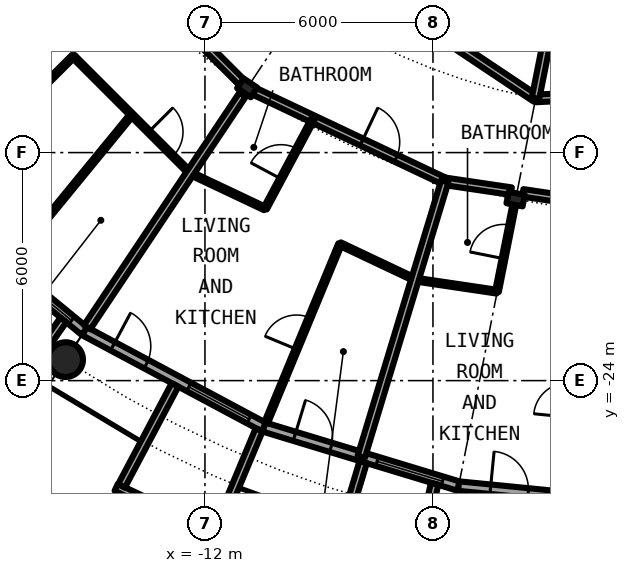
"""IFC4 building model, lengths in metres.
Left out: names, types, materials, properties, quantities, classifications, styles, units other than length and angle.
Written with IfcOpenShell. Run it as: python <this file> out.ifc"""

import sys

from ifc_helpers import new_model, si_unit, direction, frame, frame_2d, origin, origin_2d, place, context, subcontext, project, spatial, rectangle, circle, hollow_circle, i_section, extrude, element, fill, save


model = new_model("IFC4")
c1 = context("Model", 3, precision=1e-05, world=origin(), true_north=direction((0.0, 1.0)))
c2 = subcontext(c1, "Body", "Model", "MODEL_VIEW")
j1 = project(units=[si_unit("LENGTHUNIT", "METRE"), si_unit("PLANEANGLEUNIT", "RADIAN")], contexts=[c1])
p1 = place(None, origin())
s1 = spatial("IfcSite", under=j1, at=p1, CompositionType="ELEMENT")
p2 = place(p1, origin())
s2 = spatial("IfcBuilding", under=s1, at=p2, CompositionType="ELEMENT")
p3 = place(p2, frame((0.0, 0.0, 123.85)))
s3 = spatial("IfcBuildingStorey", under=s2, at=p3, CompositionType="ELEMENT", Elevation=123.85)
p4 = place(p3, frame((-15.667, -23.448, 0.0), z_axis=(0.0, 0.0, 1.0), x_axis=(1.0, 0.0, 0.0)))
e1 = element("IfcColumn", 1, at=p4, inside=s3, PredefinedType="COLUMN", context=c2, shape_type="SweptSolid", body=[
    extrude(hollow_circle(Radius=0.457, WallThickness=0.04, at=origin_2d()), origin(), (0.0, 0.0, 1.0), 3.05),
])
for number, where, z_axis, x_axis in (
    (2, (-10.889, -16.297, 0.0), (0.0, 0.0, 1.0), (-0.556, -0.831, 0.0)),
    (3, (-3.824, -19.223, 0.0), (0.0, 0.0, 1.0), (-0.195, -0.981, 0.0)),
):
    element("IfcColumn", number, at=place(p3, frame(where, z_axis=z_axis, x_axis=x_axis)), inside=s3, PredefinedType="COLUMN", context=c2, shape_type="SweptSolid", body=[
        extrude(i_section(OverallWidth=0.307, OverallDepth=0.432, WebThickness=0.021, FlangeThickness=0.04, FilletRadius=0.027, at=origin_2d()), origin(), (0.0, 0.0, 1.0), 3.05),
    ])
p5 = place(p3, frame((-19.304, -19.304, 0.0), z_axis=(0.0, 0.0, 1.0), x_axis=(0.773019449054, -0.634382322723, 0.0)))
e4 = element("IfcWall", 4, at=p5, inside=s3, PredefinedType="SOLIDWALL", context=c2, shape_type="SweptSolid", body=[
    extrude(rectangle(XDim=5.352, YDim=0.25, at=frame_2d((2.676, 0.0))), origin(), (0.0, 0.0, 1.0), 2.7),
])
p6 = place(p5, frame((0.841, 0.0, 0.0)))
e5 = element("IfcOpeningElement", 5, at=p6, cuts=e4, PredefinedType="OPENING", context=c2, shape_type="SweptSolid", body=[
    extrude(rectangle(XDim=1.0, YDim=2.2, at=frame_2d((0.5, 1.1))), frame((0.0, 0.135, 0.0), z_axis=(0.0, -1.0, 0.0), x_axis=(1.0, 0.0, 0.0)), (0.0, 0.0, 1.0), 0.27),
])
p7 = place(p5, frame((3.111, 0.0, 0.3)))
e6 = element("IfcOpeningElement", 6, at=p7, cuts=e4, PredefinedType="OPENING", context=c2, shape_type="SweptSolid", body=[
    extrude(rectangle(XDim=1.8, YDim=2.1, at=frame_2d((0.9, 1.05))), frame((0.0, 0.135, 0.0), z_axis=(0.0, -1.0, 0.0), x_axis=(1.0, 0.0, 0.0)), (0.0, 0.0, 1.0), 0.27),
])
p8 = place(p3, frame((-15.726, -22.402, -0.03), z_axis=(0.0, 0.0, 1.0), x_axis=(-0.574826383135, -0.818275399393, 0.0)))
e7 = element("IfcWall", 7, at=p8, inside=s3, PredefinedType="SOLIDWALL", context=c2, shape_type="SweptSolid", body=[
    extrude(rectangle(XDim=2.929, YDim=0.2, at=frame_2d((1.465, 0.0))), origin(), (0.0, 0.0, 1.0), 2.73),
])
p9 = place(p3, frame((-15.167, -22.699, 0.0), z_axis=(0.0, 0.0, 1.0), x_axis=(0.881915646801, -0.471407246368, 0.0)))
e8 = element("IfcWall", 8, at=p9, inside=s3, PredefinedType="SOLIDWALL", context=c2, shape_type="SweptSolid", body=[
    extrude(rectangle(XDim=5.352, YDim=0.25, at=frame_2d((2.676, 0.0))), origin(), (0.0, 0.0, 1.0), 2.7),
])
p10 = place(p9, frame((0.841, 0.0, 0.0)))
e9 = element("IfcOpeningElement", 9, at=p10, cuts=e8, PredefinedType="OPENING", context=c2, shape_type="SweptSolid", body=[
    extrude(rectangle(XDim=1.0, YDim=2.2, at=frame_2d((0.5, 1.1))), frame((0.0, 0.135, 0.0), z_axis=(0.0, -1.0, 0.0), x_axis=(1.0, 0.0, 0.0)), (0.0, 0.0, 1.0), 0.27),
])
p11 = place(p9, frame((3.111, 0.0, 0.3)))
e10 = element("IfcOpeningElement", 10, at=p11, cuts=e8, PredefinedType="OPENING", context=c2, shape_type="SweptSolid", body=[
    extrude(rectangle(XDim=1.8, YDim=2.1, at=frame_2d((0.9, 1.05))), frame((0.0, 0.135, 0.0), z_axis=(0.0, -1.0, 0.0), x_axis=(1.0, 0.0, 0.0)), (0.0, 0.0, 1.0), 0.27),
])
p12 = place(p3, frame((-14.335, -26.808, -0.03), z_axis=(0.0, 0.0, 1.0), x_axis=(0.904000060331, -0.427532327342, 0.0)))
e11 = element("IfcWall", 11, at=p12, inside=s3, PredefinedType="SOLIDWALL", context=c2, shape_type="SweptSolid", body=[
    extrude(rectangle(XDim=2.993, YDim=0.2, at=frame_2d((1.497, 0.0))), origin(), (0.0, 0.0, 1.0), 2.73),
])
p13 = place(p12, frame((0.457, 0.0, 0.33)))
e12 = element("IfcOpeningElement", 12, at=p13, cuts=e11, PredefinedType="OPENING", context=c2, shape_type="SweptSolid", body=[
    extrude(circle(Radius=1.04, at=frame_2d((1.04, 1.04))), frame((0.0, 0.11, 0.0), z_axis=(0.0, -1.0, 0.0), x_axis=(1.0, 0.0, 0.0)), (0.0, 0.0, 1.0), 0.22),
])
p14 = place(p3, frame((-12.787, -24.113, -0.03), z_axis=(0.0, 0.0, 1.0), x_axis=(-0.468365282436, -0.883534924159, 0.0)))
e13 = element("IfcWall", 13, at=p14, inside=s3, PredefinedType="SOLIDWALL", context=c2, shape_type="SweptSolid", body=[
    extrude(rectangle(XDim=3.006, YDim=0.2, at=frame_2d((1.503, 0.0))), origin(), (0.0, 0.0, 1.0), 2.73),
])
p15 = place(p3, frame((-10.575, -25.295, -0.03), z_axis=(0.0, 0.0, 1.0), x_axis=(-0.385697364644, -0.922625353492, 0.0)))
e14 = element("IfcWall", 14, at=p15, inside=s3, PredefinedType="SOLIDWALL", context=c2, shape_type="SweptSolid", body=[
    extrude(rectangle(XDim=2.883, YDim=0.2, at=frame_2d((1.442, 0.0))), origin(), (0.0, 0.0, 1.0), 2.73),
])
p16 = place(p3, frame((-10.447, -25.222, 0.0), z_axis=(0.0, 0.0, 1.0), x_axis=(0.956965678721, -0.290201119486, 0.0)))
e15 = element("IfcWall", 15, at=p16, inside=s3, PredefinedType="SOLIDWALL", context=c2, shape_type="SweptSolid", body=[
    extrude(rectangle(XDim=5.351, YDim=0.25, at=frame_2d((2.676, 0.0))), origin(), (0.0, 0.0, 1.0), 2.7),
])
p17 = place(p16, frame((0.841, 0.0, 0.0)))
e16 = element("IfcOpeningElement", 16, at=p17, cuts=e15, PredefinedType="OPENING", context=c2, shape_type="SweptSolid", body=[
    extrude(rectangle(XDim=1.0, YDim=2.2, at=frame_2d((0.5, 1.1))), frame((0.0, 0.135, 0.0), z_axis=(0.0, -1.0, 0.0), x_axis=(1.0, 0.0, 0.0)), (0.0, 0.0, 1.0), 0.27),
])
p18 = place(p16, frame((3.111, 0.0, 0.3)))
e17 = element("IfcOpeningElement", 17, at=p18, cuts=e15, PredefinedType="OPENING", context=c2, shape_type="SweptSolid", body=[
    extrude(rectangle(XDim=1.8, YDim=2.1, at=frame_2d((0.9, 1.05))), frame((0.0, 0.135, 0.0), z_axis=(0.0, -1.0, 0.0), x_axis=(1.0, 0.0, 0.0)), (0.0, 0.0, 1.0), 0.27),
])
p19 = place(p3, frame((-7.837, -26.144, -0.03), z_axis=(0.0, 0.0, 1.0), x_axis=(-0.287064767992, -0.957911174889, 0.0)))
e18 = element("IfcWall", 18, at=p19, inside=s3, PredefinedType="SOLIDWALL", context=c2, shape_type="SweptSolid", body=[
    extrude(rectangle(XDim=3.006, YDim=0.2, at=frame_2d((1.503, 0.0))), origin(), (0.0, 0.0, 1.0), 2.73),
])
p20 = place(p3, frame((-5.957, -26.715, -0.03), z_axis=(0.0, 0.0, 1.0), x_axis=(-0.217857287091, -0.975980636315, 0.0)))
e19 = element("IfcWall", 19, at=p20, inside=s3, PredefinedType="SOLIDWALL", context=c2, shape_type="SweptSolid", body=[
    extrude(rectangle(XDim=2.928, YDim=0.2, at=frame_2d((1.464, 0.0))), origin(), (0.0, 0.0, 1.0), 2.73),
])
p21 = place(p3, frame((-5.326, -26.775, 0.0), z_axis=(0.0, 0.0, 1.0), x_axis=(0.995173996315, -0.098126026407, 0.0)))
e20 = element("IfcWall", 20, at=p21, inside=s3, PredefinedType="SOLIDWALL", context=c2, shape_type="SweptSolid", body=[
    extrude(rectangle(XDim=5.352, YDim=0.25, at=frame_2d((2.676, 0.0))), origin(), (0.0, 0.0, 1.0), 2.7),
])
p22 = place(p21, frame((0.841, 0.0, 0.0)))
e21 = element("IfcOpeningElement", 21, at=p22, cuts=e20, PredefinedType="OPENING", context=c2, shape_type="SweptSolid", body=[
    extrude(rectangle(XDim=1.0, YDim=2.2, at=frame_2d((0.5, 1.1))), frame((0.0, 0.135, 0.0), z_axis=(0.0, -1.0, 0.0), x_axis=(1.0, 0.0, 0.0)), (0.0, 0.0, 1.0), 0.27),
])
p23 = place(p21, frame((3.111, 0.0, 0.3)))
e22 = element("IfcOpeningElement", 22, at=p23, cuts=e20, PredefinedType="OPENING", context=c2, shape_type="SweptSolid", body=[
    extrude(rectangle(XDim=1.8, YDim=2.1, at=frame_2d((0.9, 1.05))), frame((0.0, 0.135, 0.0), z_axis=(0.0, -1.0, 0.0), x_axis=(1.0, 0.0, 0.0)), (0.0, 0.0, 1.0), 0.27),
])
p24 = place(p3, frame((-12.397, -18.537, 0.0), z_axis=(0.0, 0.0, 1.0), x_axis=(0.903951937529, -0.427634066274, 0.0)))
e23 = element("IfcWall", 23, at=p24, inside=s3, PredefinedType="PARTITIONING", context=c2, shape_type="SweptSolid", body=[
    extrude(rectangle(XDim=2.181, YDim=0.1, at=frame_2d((1.091, 0.0))), origin(), (0.0, 0.0, 1.0), 2.7),
])
p25 = place(p3, frame((-8.445, -20.407, 0.0), z_axis=(0.0, 0.0, 1.0), x_axis=(0.903929143338, -0.427682246328, 0.0)))
e24 = element("IfcWall", 24, at=p25, inside=s3, PredefinedType="PARTITIONING", context=c2, shape_type="SweptSolid", body=[
    extrude(rectangle(XDim=2.182, YDim=0.1, at=frame_2d((1.091, 0.0))), origin(), (0.0, 0.0, 1.0), 2.7),
])
p26 = place(p3, frame((-6.473, -21.34, 0.0), z_axis=(0.0, 0.0, 1.0), x_axis=(0.989185420695, -0.146670390618, 0.0)))
e25 = element("IfcWall", 25, at=p26, inside=s3, PredefinedType="PARTITIONING", context=c2, shape_type="SweptSolid", body=[
    extrude(rectangle(XDim=2.181, YDim=0.1, at=frame_2d((1.09, 0.0))), origin(), (0.0, 0.0, 1.0), 2.7),
])
p27 = place(p3, frame((-15.463, -15.468, 0.0), z_axis=(0.0, 0.0, 1.0), x_axis=(0.707106781187, -0.707106781187, 0.0)))
e26 = element("IfcWall", 26, at=p27, inside=s3, PredefinedType="PARTITIONING", context=c2, shape_type="SweptSolid", body=[
    extrude(rectangle(XDim=4.351, YDim=0.1, at=frame_2d((2.176, 0.0))), origin(), (0.0, 0.0, 1.0), 2.7),
])
p28 = place(p27, frame((2.808, 0.0, 0.0)))
e27 = element("IfcOpeningElement", 27, at=p28, cuts=e26, PredefinedType="OPENING", context=c2, shape_type="SweptSolid", body=[
    extrude(rectangle(XDim=0.9, YDim=2.3, at=frame_2d((0.45, 1.15))), frame((0.0, 0.06, 0.0), z_axis=(0.0, -1.0, 0.0), x_axis=(1.0, 0.0, 0.0)), (0.0, 0.0, 1.0), 0.12),
])
p29 = place(p3, frame((-10.749, -16.363, 0.0), z_axis=(0.0, 0.0, 1.0), x_axis=(0.903968655954, -0.427598724335, 0.0)))
e28 = element("IfcWall", 28, at=p29, inside=s3, PredefinedType="PARTITIONING", context=c2, shape_type="SweptSolid", body=[
    extrude(rectangle(XDim=5.596, YDim=0.2, at=frame_2d((2.798, 0.0))), origin(), (0.0, 0.0, 1.0), 2.39),
])
p30 = place(p29, frame((3.179, 0.0, 0.0)))
e29 = element("IfcOpeningElement", 29, at=p30, cuts=e28, PredefinedType="OPENING", context=c2, shape_type="SweptSolid", body=[
    extrude(rectangle(XDim=1.0, YDim=2.3, at=frame_2d((0.5, 1.15))), frame((0.0, 0.11, 0.0), z_axis=(0.0, -1.0, 0.0), x_axis=(1.0, 0.0, 0.0)), (0.0, 0.0, 1.0), 0.22),
])
p31 = place(p3, frame((-5.696, -18.755, 0.0), z_axis=(0.0, 0.0, 1.0), x_axis=(0.989227802256, -0.146384272531, 0.0)))
e30 = element("IfcWall", 30, at=p31, inside=s3, PredefinedType="PARTITIONING", context=c2, shape_type="SweptSolid", body=[
    extrude(rectangle(XDim=1.776, YDim=0.2, at=frame_2d((0.888, 0.0))), origin(), (0.0, 0.0, 1.0), 2.39),
])
p32 = place(p3, frame((-3.635, -19.06, 0.0), z_axis=(0.0, 0.0, 1.0), x_axis=(0.989143454832, -0.146953141385, 0.0)))
e31 = element("IfcWall", 31, at=p32, inside=s3, PredefinedType="PARTITIONING", context=c2, shape_type="SweptSolid", body=[
    extrude(rectangle(XDim=3.675, YDim=0.2, at=frame_2d((1.837, 0.0))), origin(), (0.0, 0.0, 1.0), 2.39),
])
p33 = place(p32, frame((1.258, 0.0, 0.0)))
e32 = element("IfcOpeningElement", 32, at=p33, cuts=e31, PredefinedType="OPENING", context=c2, shape_type="SweptSolid", body=[
    extrude(rectangle(XDim=1.0, YDim=2.3, at=frame_2d((0.5, 1.15))), frame((0.0, 0.11, 0.0), z_axis=(0.0, -1.0, 0.0), x_axis=(1.0, 0.0, 0.0)), (0.0, 0.0, 1.0), 0.22),
])
p34 = place(p3, frame((-16.186, -11.0, 0.0), z_axis=(0.0, 0.0, 1.0), x_axis=(0.707106781187, -0.707106781187, 0.0)))
e33 = element("IfcWall", 33, at=p34, inside=s3, PredefinedType="PARTITIONING", context=c2, shape_type="SweptSolid", body=[
    extrude(rectangle(XDim=7.334, YDim=0.2, at=frame_2d((3.667, 0.0))), origin(), (0.0, 0.0, 1.0), 2.39),
])
p35 = place(p34, frame((4.123, 0.0, 0.0)))
e34 = element("IfcOpeningElement", 34, at=p35, cuts=e33, PredefinedType="OPENING", context=c2, shape_type="SweptSolid", body=[
    extrude(rectangle(XDim=1.0, YDim=2.3, at=frame_2d((0.5, 1.15))), frame((0.0, 0.11, 0.0), z_axis=(0.0, -1.0, 0.0), x_axis=(1.0, 0.0, 0.0)), (0.0, 0.0, 1.0), 0.22),
])
p36 = place(p3, frame((-3.297, -16.575, 0.0), z_axis=(0.0, 0.0, 1.0), x_axis=(0.998796706656, 0.0490422142, 0.0)))
e35 = element("IfcWall", 35, at=p36, inside=s3, PredefinedType="PARTITIONING", context=c2, shape_type="SweptSolid", body=[
    extrude(rectangle(XDim=8.214, YDim=0.2, at=frame_2d((4.107, 0.0))), origin(), (0.0, 0.0, 1.0), 2.7),
])
p37 = place(p36, frame((3.614, 0.0, 0.0)))
e36 = element("IfcOpeningElement", 36, at=p37, cuts=e35, PredefinedType="OPENING", context=c2, shape_type="SweptSolid", body=[
    extrude(rectangle(XDim=1.0, YDim=2.3, at=frame_2d((0.5, 1.15))), frame((0.0, 0.11, 0.0), z_axis=(0.0, -1.0, 0.0), x_axis=(1.0, 0.0, 0.0)), (0.0, 0.0, 1.0), 0.22),
])
p38 = place(p3, frame((-12.706, -10.291, 0.0), z_axis=(0.0, 0.0, 1.0), x_axis=(0.831588572532, -0.555392155178, 0.0)))
e37 = element("IfcWall", 37, at=p38, inside=s3, PredefinedType="PARTITIONING", context=c2, shape_type="SweptSolid", body=[
    extrude(rectangle(XDim=11.314, YDim=0.2, at=frame_2d((5.657, 0.0))), origin(), (0.0, 0.0, 1.0), 2.7),
])
p39 = place(p38, frame((5.966, 0.0, 0.0)))
e38 = element("IfcOpeningElement", 38, at=p39, cuts=e37, PredefinedType="OPENING", context=c2, shape_type="SweptSolid", body=[
    extrude(rectangle(XDim=1.0, YDim=2.3, at=frame_2d((0.5, 1.15))), frame((0.0, 0.11, 0.0), z_axis=(0.0, -1.0, 0.0), x_axis=(1.0, 0.0, 0.0)), (0.0, 0.0, 1.0), 0.22),
])
p40 = place(p3, frame((-19.216, -19.216, 0.0), z_axis=(0.0, 0.0, 1.0), x_axis=(0.707106781187, 0.707106781187, 0.0)))
e39 = element("IfcWall", 39, at=p40, inside=s3, PredefinedType="PARTITIONING", context=c2, shape_type="SweptSolid", body=[
    extrude(rectangle(XDim=5.305, YDim=0.1, at=frame_2d((2.652, 0.0))), origin(), (0.0, 0.0, 1.0), 2.7),
])
p41 = place(p40, frame((2.202, 0.0, 0.0)))
e40 = element("IfcOpeningElement", 40, at=p41, cuts=e39, PredefinedType="OPENING", context=c2, shape_type="SweptSolid", body=[
    extrude(rectangle(XDim=0.9, YDim=2.3, at=frame_2d((0.45, 1.15))), frame((0.0, 0.06, 0.0), z_axis=(0.0, -1.0, 0.0), x_axis=(1.0, 0.0, 0.0)), (0.0, 0.0, 1.0), 0.12),
])
p42 = place(p3, frame((-17.22, -21.023, 0.0), z_axis=(0.0, 0.0, 1.0), x_axis=(0.633774976367, 0.773517471898, 0.0)))
e41 = element("IfcWall", 41, at=p42, inside=s3, PredefinedType="PARTITIONING", context=c2, shape_type="SweptSolid", body=[
    extrude(rectangle(XDim=5.196, YDim=0.1, at=frame_2d((2.598, 0.0))), origin(), (0.0, 0.0, 1.0), 2.7),
])
p43 = place(p3, frame((-15.1, -22.594, 0.0), z_axis=(0.0, 0.0, 1.0), x_axis=(0.555779189795, 0.831329953864, 0.0)))
e42 = element("IfcWall", 42, at=p43, inside=s3, PredefinedType="PARTITIONING", context=c2, shape_type="SweptSolid", body=[
    extrude(rectangle(XDim=7.359, YDim=0.2, at=frame_2d((3.68, 0.0))), origin(), (0.0, 0.0, 1.0), 2.7),
])
p44 = place(p3, frame((-10.417, -19.474, 0.0), z_axis=(0.0, 0.0, 1.0), x_axis=(0.471701791767, 0.881758141241, 0.0)))
e43 = element("IfcWall", 43, at=p44, inside=s3, PredefinedType="PARTITIONING", context=c2, shape_type="SweptSolid", body=[
    extrude(rectangle(XDim=2.673, YDim=0.1, at=frame_2d((1.337, 0.0))), origin(), (0.0, 0.0, 1.0), 2.7),
])
p45 = place(p44, frame((0.887, 0.0, 0.0)))
e44 = element("IfcOpeningElement", 44, at=p45, cuts=e43, PredefinedType="OPENING", context=c2, shape_type="SweptSolid", body=[
    extrude(rectangle(XDim=0.9, YDim=2.3, at=frame_2d((0.45, 1.15))), frame((0.0, 0.06, 0.0), z_axis=(0.0, -1.0, 0.0), x_axis=(1.0, 0.0, 0.0)), (0.0, 0.0, 1.0), 0.12),
])
p46 = place(p3, frame((-10.391, -25.11, 0.0), z_axis=(0.0, 0.0, 1.0), x_axis=(0.382339082848, 0.92402209158, 0.0)))
e45 = element("IfcWall", 45, at=p46, inside=s3, PredefinedType="PARTITIONING", context=c2, shape_type="SweptSolid", body=[
    extrude(rectangle(XDim=5.09, YDim=0.1, at=frame_2d((2.545, 0.0))), origin(), (0.0, 0.0, 1.0), 2.7),
])
p47 = place(p46, frame((2.095, 0.0, 0.0)))
e46 = element("IfcOpeningElement", 46, at=p47, cuts=e45, PredefinedType="OPENING", context=c2, shape_type="SweptSolid", body=[
    extrude(rectangle(XDim=0.9, YDim=2.3, at=frame_2d((0.45, 1.15))), frame((0.0, 0.06, 0.0), z_axis=(0.0, -1.0, 0.0), x_axis=(1.0, 0.0, 0.0)), (0.0, 0.0, 1.0), 0.12),
])
p48 = place(p3, frame((-7.888, -26.005, 0.0), z_axis=(0.0, 0.0, 1.0), x_axis=(0.290294523619, 0.956937348815, 0.0)))
e47 = element("IfcWall", 47, at=p48, inside=s3, PredefinedType="PARTITIONING", context=c2, shape_type="SweptSolid", body=[
    extrude(rectangle(XDim=7.575, YDim=0.2, at=frame_2d((3.788, 0.0))), origin(), (0.0, 0.0, 1.0), 2.7),
])
p49 = place(p3, frame((-4.316, -21.66, 0.0), z_axis=(0.0, 0.0, 1.0), x_axis=(0.195557580153, 0.980692221262, 0.0)))
e48 = element("IfcWall", 48, at=p49, inside=s3, PredefinedType="PARTITIONING", context=c2, shape_type="SweptSolid", body=[
    extrude(rectangle(XDim=2.27, YDim=0.1, at=frame_2d((1.135, 0.0))), origin(), (0.0, 0.0, 1.0), 2.7),
])
p50 = place(p49, frame((0.887, 0.0, 0.0)))
e49 = element("IfcOpeningElement", 49, at=p50, cuts=e48, PredefinedType="OPENING", context=c2, shape_type="SweptSolid", body=[
    extrude(rectangle(XDim=0.9, YDim=2.3, at=frame_2d((0.45, 1.15))), frame((0.0, 0.06, 0.0), z_axis=(0.0, -1.0, 0.0), x_axis=(1.0, 0.0, 0.0)), (0.0, 0.0, 1.0), 0.12),
])
p51 = place(p3, frame((-3.302, -16.574, 0.0), z_axis=(0.0, 0.0, 1.0), x_axis=(0.195543237077, 0.980695081273, 0.0)))
e50 = element("IfcWall", 50, at=p51, inside=s3, PredefinedType="PARTITIONING", context=c2, shape_type="SweptSolid", body=[
    extrude(rectangle(XDim=9.179, YDim=0.2, at=frame_2d((4.59, 0.0))), origin(), (0.0, 0.0, 1.0), 2.7),
])
p52 = place(p7, origin())
e51 = element("IfcWindow", 51, at=p52, inside=s3, PartitioningType="SINGLE_PANEL", PredefinedType="WINDOW", context=c2, shape_type="SweptSolid", body=[
    extrude(rectangle(XDim=1.8, YDim=2.1, at=frame_2d((0.9, 1.05))), frame((0.0, 0.03, 0.0), z_axis=(0.0, -1.0, 0.0), x_axis=(1.0, 0.0, 0.0)), (0.0, 0.0, 1.0), 0.06),
])
fill(e6, e51)
p53 = place(p10, origin())
e52 = element("IfcDoor", 52, at=p53, inside=s3, OperationType="SINGLE_SWING_LEFT", PredefinedType="DOOR", context=c2, shape_type="SweptSolid", body=[
    extrude(rectangle(XDim=1.0, YDim=2.2, at=frame_2d((0.5, 1.1))), frame((0.0, 0.025, 0.0), z_axis=(0.0, -1.0, 0.0), x_axis=(1.0, 0.0, 0.0)), (0.0, 0.0, 1.0), 0.05),
])
fill(e9, e52)
p54 = place(p11, origin())
e53 = element("IfcWindow", 53, at=p54, inside=s3, PartitioningType="SINGLE_PANEL", PredefinedType="WINDOW", context=c2, shape_type="SweptSolid", body=[
    extrude(rectangle(XDim=1.8, YDim=2.1, at=frame_2d((0.9, 1.05))), frame((0.0, 0.03, 0.0), z_axis=(0.0, -1.0, 0.0), x_axis=(1.0, 0.0, 0.0)), (0.0, 0.0, 1.0), 0.06),
])
fill(e10, e53)
p55 = place(p17, origin())
e54 = element("IfcDoor", 54, at=p55, inside=s3, OperationType="SINGLE_SWING_LEFT", PredefinedType="DOOR", context=c2, shape_type="SweptSolid", body=[
    extrude(rectangle(XDim=1.0, YDim=2.2, at=frame_2d((0.5, 1.1))), frame((0.0, 0.025, 0.0), z_axis=(0.0, -1.0, 0.0), x_axis=(1.0, 0.0, 0.0)), (0.0, 0.0, 1.0), 0.05),
])
fill(e16, e54)
p56 = place(p18, origin())
e55 = element("IfcWindow", 55, at=p56, inside=s3, PartitioningType="SINGLE_PANEL", PredefinedType="WINDOW", context=c2, shape_type="SweptSolid", body=[
    extrude(rectangle(XDim=1.8, YDim=2.1, at=frame_2d((0.9, 1.05))), frame((0.0, 0.03, 0.0), z_axis=(0.0, -1.0, 0.0), x_axis=(1.0, 0.0, 0.0)), (0.0, 0.0, 1.0), 0.06),
])
fill(e17, e55)
p57 = place(p22, origin())
e56 = element("IfcDoor", 56, at=p57, inside=s3, OperationType="SINGLE_SWING_LEFT", PredefinedType="DOOR", context=c2, shape_type="SweptSolid", body=[
    extrude(rectangle(XDim=1.0, YDim=2.2, at=frame_2d((0.5, 1.1))), frame((0.0, 0.025, 0.0), z_axis=(0.0, -1.0, 0.0), x_axis=(1.0, 0.0, 0.0)), (0.0, 0.0, 1.0), 0.05),
])
fill(e21, e56)
p58 = place(p28, origin())
e57 = element("IfcDoor", 57, at=p58, inside=s3, OperationType="SINGLE_SWING_RIGHT", PredefinedType="DOOR", context=c2, shape_type="SweptSolid", body=[
    extrude(rectangle(XDim=0.9, YDim=2.3, at=frame_2d((0.45, 1.15))), frame((0.0, 0.025, 0.0), z_axis=(0.0, -1.0, 0.0), x_axis=(1.0, 0.0, 0.0)), (0.0, 0.0, 1.0), 0.05),
])
fill(e27, e57)
p59 = place(p30, origin())
e58 = element("IfcDoor", 58, at=p59, inside=s3, OperationType="SINGLE_SWING_RIGHT", PredefinedType="DOOR", context=c2, shape_type="SweptSolid", body=[
    extrude(rectangle(XDim=1.0, YDim=2.3, at=frame_2d((0.5, 1.15))), frame((0.0, 0.025, 0.0), z_axis=(0.0, -1.0, 0.0), x_axis=(1.0, 0.0, 0.0)), (0.0, 0.0, 1.0), 0.05),
])
fill(e29, e58)
p60 = place(p45, origin())
e59 = element("IfcDoor", 59, at=p60, inside=s3, OperationType="SINGLE_SWING_RIGHT", PredefinedType="DOOR", context=c2, shape_type="SweptSolid", body=[
    extrude(rectangle(XDim=0.9, YDim=2.3, at=frame_2d((0.45, 1.15))), frame((0.0, 0.025, 0.0), z_axis=(0.0, -1.0, 0.0), x_axis=(1.0, 0.0, 0.0)), (0.0, 0.0, 1.0), 0.05),
])
fill(e44, e59)
p61 = place(p47, origin())
e60 = element("IfcDoor", 60, at=p61, inside=s3, OperationType="SINGLE_SWING_RIGHT", PredefinedType="DOOR", context=c2, shape_type="SweptSolid", body=[
    extrude(rectangle(XDim=0.9, YDim=2.3, at=frame_2d((0.45, 1.15))), frame((0.0, 0.025, 0.0), z_axis=(0.0, -1.0, 0.0), x_axis=(1.0, 0.0, 0.0)), (0.0, 0.0, 1.0), 0.05),
])
fill(e46, e60)
p62 = place(p50, origin())
e61 = element("IfcDoor", 61, at=p62, inside=s3, OperationType="SINGLE_SWING_RIGHT", PredefinedType="DOOR", context=c2, shape_type="SweptSolid", body=[
    extrude(rectangle(XDim=0.9, YDim=2.3, at=frame_2d((0.45, 1.15))), frame((0.0, 0.025, 0.0), z_axis=(0.0, -1.0, 0.0), x_axis=(1.0, 0.0, 0.0)), (0.0, 0.0, 1.0), 0.05),
])
fill(e49, e61)
save(model, sys.argv[1])
